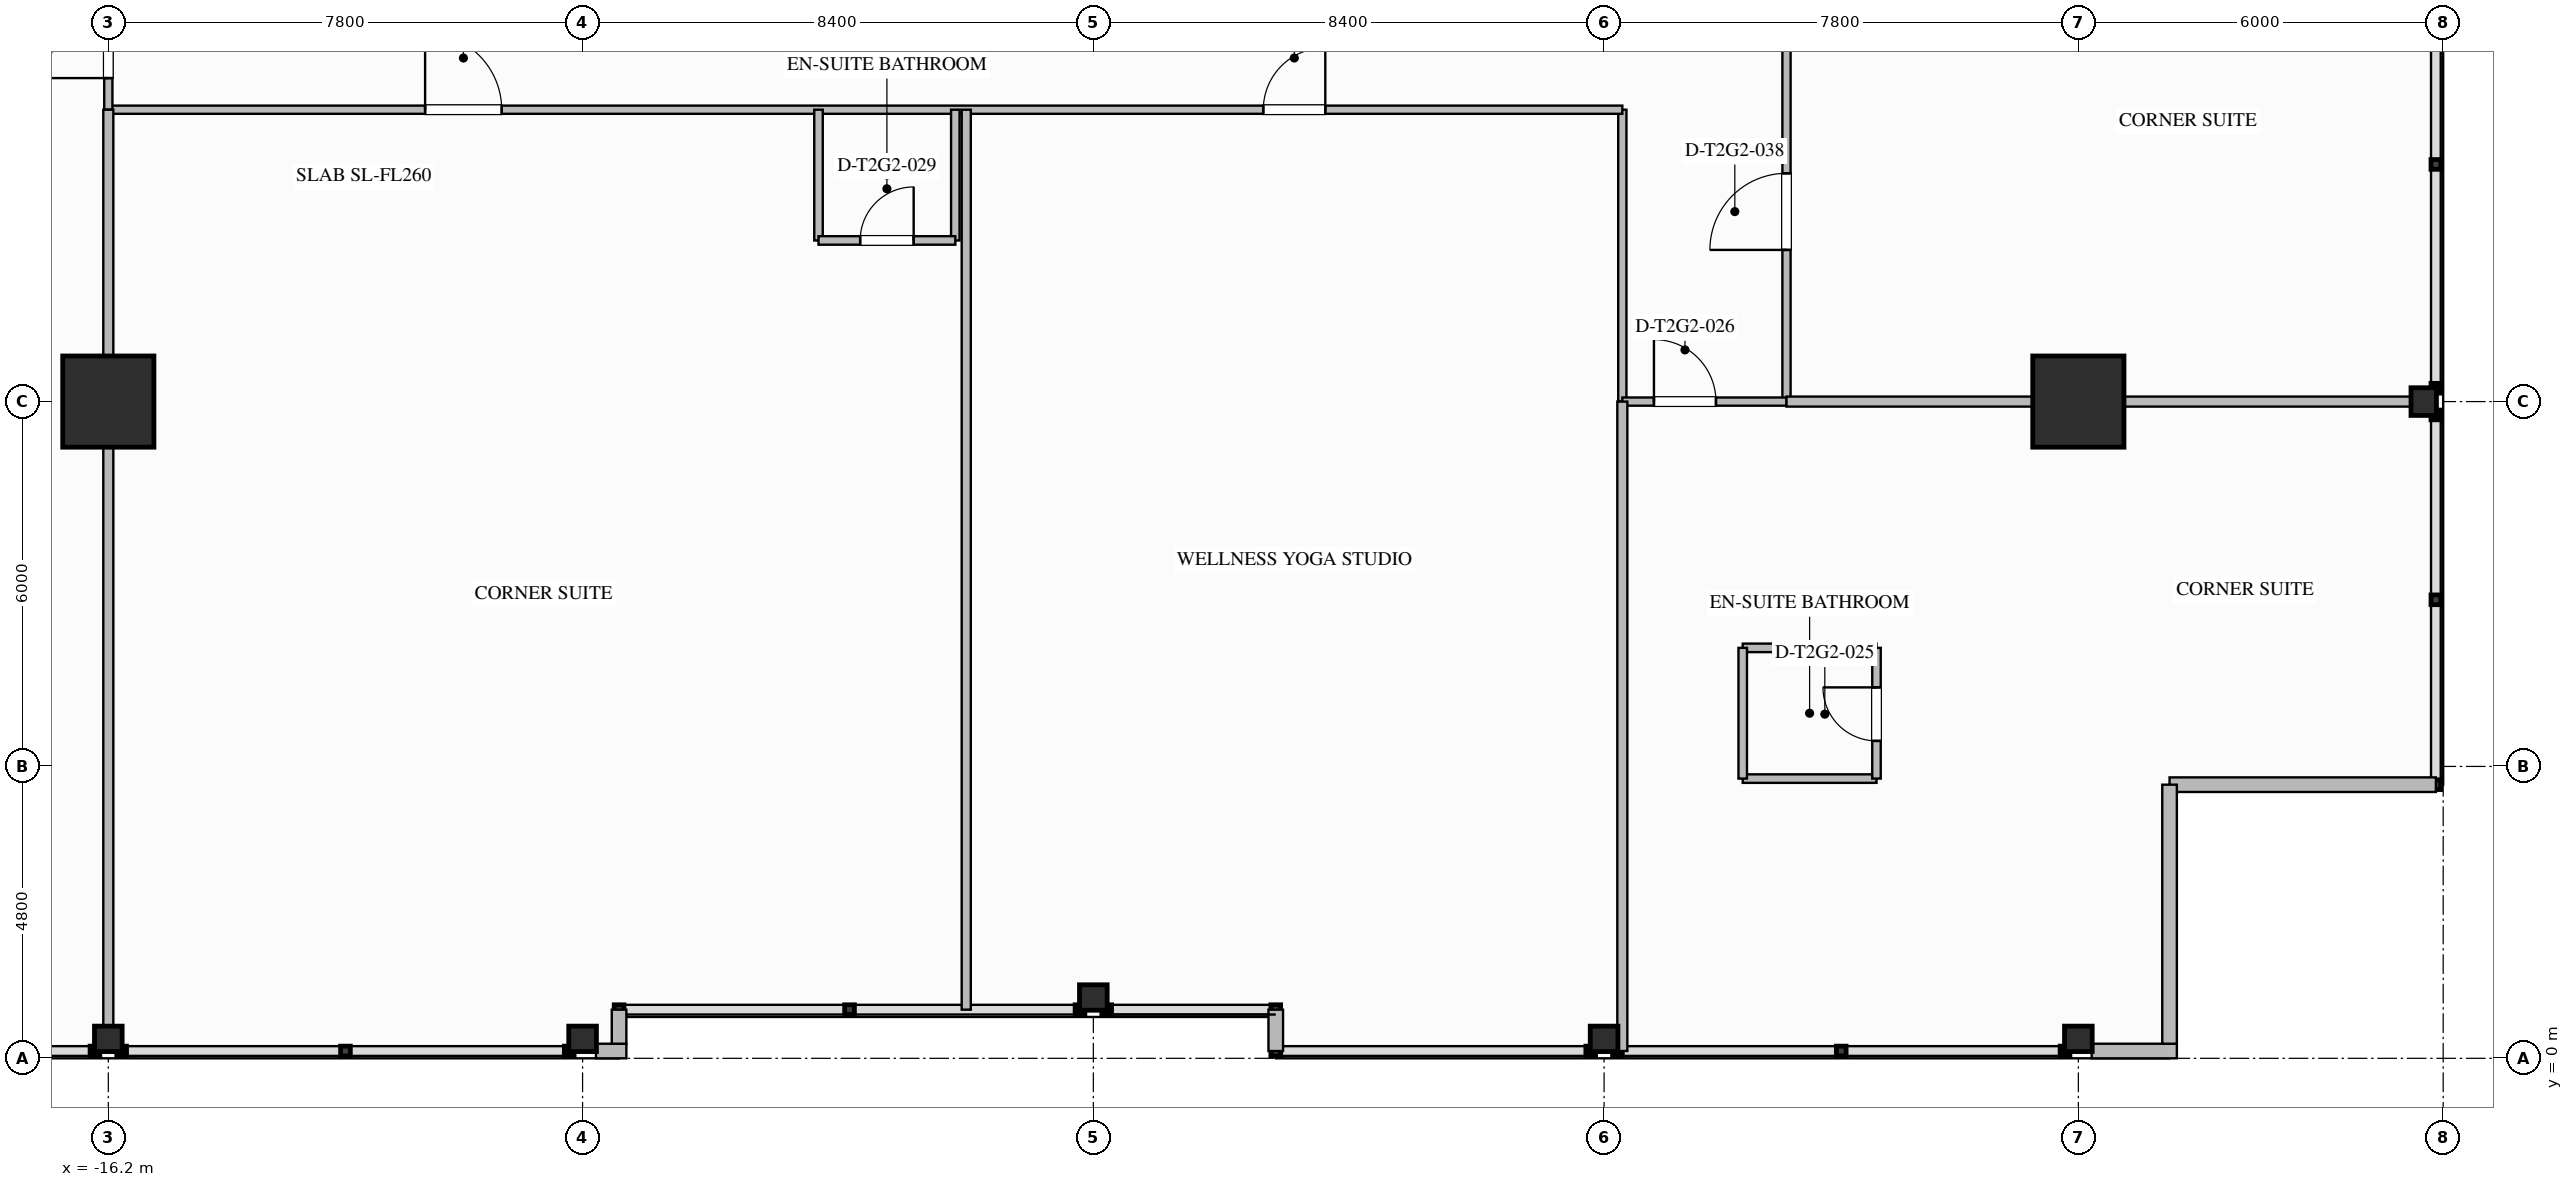
"""IFC4 building model, lengths in metres.
Left out: names, types, materials, properties, quantities, classifications, styles, units other than length and angle.
Written with IfcOpenShell. Run it as: python <this file> out.ifc"""

import sys

from ifc_helpers import new_model, si_unit, direction, frame, frame_2d, origin, origin_2d, place, context, subcontext, project, spatial, rectangle, i_section, extrude, element, fill, save


model = new_model("IFC4")
c1 = context("Model", 3, precision=1e-05, world=origin(), true_north=direction((0.0, 1.0)))
c2 = subcontext(c1, "Body", "Model", "MODEL_VIEW")
j1 = project(units=[si_unit("LENGTHUNIT", "METRE"), si_unit("PLANEANGLEUNIT", "RADIAN")], contexts=[c1])
p1 = place(None, origin())
s1 = spatial("IfcSite", under=j1, at=p1, CompositionType="ELEMENT")
p2 = place(p1, origin())
s2 = spatial("IfcBuilding", under=s1, at=p2, CompositionType="ELEMENT")
p3 = place(p2, frame((0.0, 0.0, 102.3)))
s3 = spatial("IfcBuildingStorey", under=s2, at=p3, CompositionType="ELEMENT", Elevation=102.3)
for number, where, z_axis, x_axis in (
    (1, (-16.2, 10.8, 0.0), (0.0, 0.0, 1.0), (1.0, 0.0, 0.0)),
    (2, (16.2, 10.8, 0.0), (0.0, 0.0, 1.0), (1.0, 0.0, 0.0)),
):
    element("IfcColumn", number, at=place(p3, frame(where, z_axis=z_axis, x_axis=x_axis)), inside=s3, PredefinedType="COLUMN", context=c2, shape_type="SweptSolid", body=[
        extrude(rectangle(XDim=1.5, YDim=1.5, at=origin_2d()), origin(), (0.0, 0.0, 1.0), 3.5),
    ])
for number, where, z_axis, x_axis in (
    (3, (21.88, 10.8, 0.0), (0.0, 0.0, 1.0), (1.0, 0.0, 0.0)),
    (4, (-16.2, 0.32, 0.0), (0.0, 0.0, 1.0), (0.0, 1.0, 0.0)),
    (5, (-8.4, 0.32, 0.0), (0.0, 0.0, 1.0), (0.0, 1.0, 0.0)),
    (6, (0.0, 1.0, 0.0), (0.0, 0.0, 1.0), (0.0, 1.0, 0.0)),
    (7, (8.4, 0.32, 0.0), (0.0, 0.0, 1.0), (0.0, 1.0, 0.0)),
    (8, (16.2, 0.32, 0.0), (0.0, 0.0, 1.0), (0.0, 1.0, 0.0)),
):
    element("IfcColumn", number, at=place(p3, frame(where, z_axis=z_axis, x_axis=x_axis)), inside=s3, PredefinedType="COLUMN", context=c2, shape_type="SweptSolid", body=[
        extrude(i_section(OverallWidth=0.418, OverallDepth=0.455, WebThickness=0.042, FlangeThickness=0.068, FilletRadius=0.03, at=origin_2d()), origin(), (0.0, 0.0, 1.0), 3.497),
    ])
p4 = place(p3, frame((17.82, 0.12, 0.0), z_axis=(0.0, 0.0, 1.0), x_axis=(-1.0, 0.0, 0.0)))
e9 = element("IfcWall", 9, at=p4, inside=s3, PredefinedType="STANDARD", context=c2, shape_type="SweptSolid", body=[
    extrude(rectangle(XDim=1.4, YDim=0.24, at=frame_2d((0.7, 0.0))), origin(), (0.0, 0.0, 1.0), 3.24),
])
p5 = place(p3, frame((-7.68, 0.12, 0.0), z_axis=(0.0, 0.0, 1.0), x_axis=(-1.0, 0.0, 0.0)))
e10 = element("IfcWall", 10, at=p5, inside=s3, PredefinedType="STANDARD", context=c2, shape_type="SweptSolid", body=[
    extrude(rectangle(XDim=0.5, YDim=0.24, at=frame_2d((0.25, 0.0))), origin(), (0.0, 0.0, 1.0), 3.24),
])
p6 = place(p3, frame((22.08, 4.5, 0.0), z_axis=(0.0, 0.0, 1.0), x_axis=(-1.0, 0.0, 0.0)))
e11 = element("IfcWall", 11, at=p6, inside=s3, PredefinedType="STANDARD", context=c2, shape_type="SweptSolid", body=[
    extrude(rectangle(XDim=4.38, YDim=0.24, at=frame_2d((2.19, 0.0))), origin(), (0.0, 0.0, 1.0), 3.24),
])
p7 = place(p3, frame((17.7, 4.5, 0.0), z_axis=(0.0, 0.0, 1.0), x_axis=(0.0, -1.0, 0.0)))
e12 = element("IfcWall", 12, at=p7, inside=s3, PredefinedType="STANDARD", context=c2, shape_type="SweptSolid", body=[
    extrude(rectangle(XDim=4.26, YDim=0.24, at=frame_2d((2.13, 0.0))), origin(), (0.0, 0.0, 1.0), 3.24),
])
p8 = place(p3, frame((3.0, 0.12, 0.0), z_axis=(0.0, 0.0, 1.0), x_axis=(0.0, 1.0, 0.0)))
e13 = element("IfcWall", 13, at=p8, inside=s3, PredefinedType="STANDARD", context=c2, shape_type="SweptSolid", body=[
    extrude(rectangle(XDim=0.68, YDim=0.24, at=frame_2d((0.34, 0.0))), origin(), (0.0, 0.0, 1.0), 3.24),
])
p9 = place(p3, frame((-7.8, 0.8, 0.0), z_axis=(0.0, 0.0, 1.0), x_axis=(0.0, -1.0, 0.0)))
e14 = element("IfcWall", 14, at=p9, inside=s3, PredefinedType="STANDARD", context=c2, shape_type="SweptSolid", body=[
    extrude(rectangle(XDim=0.56, YDim=0.24, at=frame_2d((0.28, 0.0))), origin(), (0.0, 0.0, 1.0), 3.24),
])
p10 = place(p3, frame((8.7, 10.8, 0.0), z_axis=(0.0, 0.0, 1.0), x_axis=(0.0, 1.0, 0.0)))
e15 = element("IfcWall", 15, at=p10, inside=s3, PredefinedType="PARTITIONING", context=c2, shape_type="SweptSolid", body=[
    extrude(rectangle(XDim=4.8, YDim=0.135, at=frame_2d((2.4, 0.0))), origin(), (0.0, 0.0, 1.0), 3.24),
])
p11 = place(p3, frame((-16.2, 15.6, 0.0), z_axis=(0.0, 0.0, 1.0), x_axis=(1.0, 0.0, 0.0)))
e16 = element("IfcWall", 16, at=p11, inside=s3, PredefinedType="PARTITIONING", context=c2, shape_type="SweptSolid", body=[
    extrude(rectangle(XDim=24.9, YDim=0.135, at=frame_2d((12.45, 0.0))), origin(), (0.0, 0.0, 1.0), 3.24),
])
p12 = place(p11, frame((5.21, 0.0, 0.0)))
e17 = element("IfcOpeningElement", 17, at=p12, cuts=e16, PredefinedType="OPENING", context=c2, shape_type="SweptSolid", body=[
    extrude(rectangle(XDim=1.26, YDim=2.2, at=frame_2d((0.63, 1.1))), frame((0.0, 0.077, 0.0), z_axis=(0.0, -1.0, 0.0), x_axis=(1.0, 0.0, 0.0)), (0.0, 0.0, 1.0), 0.155),
])
p13 = place(p11, frame((18.995, 0.0, 0.0)))
e18 = element("IfcOpeningElement", 18, at=p13, cuts=e16, PredefinedType="OPENING", context=c2, shape_type="SweptSolid", body=[
    extrude(rectangle(XDim=1.02, YDim=2.15, at=frame_2d((0.51, 1.075))), frame((0.0, 0.077, 0.0), z_axis=(0.0, -1.0, 0.0), x_axis=(1.0, 0.0, 0.0)), (0.0, 0.0, 1.0), 0.155),
])
p14 = place(p3, frame((11.4, 10.8, 0.0), z_axis=(0.0, 0.0, 1.0), x_axis=(0.0, 1.0, 0.0)))
e19 = element("IfcWall", 19, at=p14, inside=s3, PredefinedType="PARTITIONING", context=c2, shape_type="SweptSolid", body=[
    extrude(rectangle(XDim=32.4, YDim=0.135, at=frame_2d((16.2, 0.0))), origin(), (0.0, 0.0, 1.0), 3.24),
])
p15 = place(p14, frame((2.494, 0.0, 0.0)))
e20 = element("IfcOpeningElement", 20, at=p15, cuts=e19, PredefinedType="OPENING", context=c2, shape_type="SweptSolid", body=[
    extrude(rectangle(XDim=1.26, YDim=2.2, at=frame_2d((0.63, 1.1))), frame((0.0, 0.077, 0.0), z_axis=(0.0, -1.0, 0.0), x_axis=(1.0, 0.0, 0.0)), (0.0, 0.0, 1.0), 0.155),
])
p16 = place(p14, frame((10.305, 0.0, 0.0)))
e21 = element("IfcOpeningElement", 21, at=p16, cuts=e19, PredefinedType="OPENING", context=c2, shape_type="SweptSolid", body=[
    extrude(rectangle(XDim=1.26, YDim=2.2, at=frame_2d((0.63, 1.1))), frame((0.0, 0.077, 0.0), z_axis=(0.0, -1.0, 0.0), x_axis=(1.0, 0.0, 0.0)), (0.0, 0.0, 1.0), 0.155),
])
p17 = place(p14, frame((18.405, 0.0, 0.0)))
e22 = element("IfcOpeningElement", 22, at=p17, cuts=e19, PredefinedType="OPENING", context=c2, shape_type="SweptSolid", body=[
    extrude(rectangle(XDim=1.26, YDim=2.2, at=frame_2d((0.63, 1.1))), frame((0.0, 0.077, 0.0), z_axis=(0.0, -1.0, 0.0), x_axis=(1.0, 0.0, 0.0)), (0.0, 0.0, 1.0), 0.155),
])
p18 = place(p14, frame((26.794, 0.0, 0.0)))
e23 = element("IfcOpeningElement", 23, at=p18, cuts=e19, PredefinedType="OPENING", context=c2, shape_type="SweptSolid", body=[
    extrude(rectangle(XDim=1.26, YDim=2.2, at=frame_2d((0.63, 1.1))), frame((0.0, 0.077, 0.0), z_axis=(0.0, -1.0, 0.0), x_axis=(1.0, 0.0, 0.0)), (0.0, 0.0, 1.0), 0.155),
])
p19 = place(p3, frame((-16.2, 15.6, 0.0), z_axis=(0.0, 0.0, 1.0), x_axis=(0.0, 1.0, 0.0)))
e24 = element("IfcWall", 24, at=p19, inside=s3, PredefinedType="PARTITIONING", context=c2, shape_type="SweptSolid", body=[
    extrude(rectangle(XDim=2.7, YDim=0.135, at=frame_2d((1.35, 0.0))), origin(), (0.0, 0.0, 1.0), 2.452),
])
p20 = place(p19, frame((0.52, 0.0, 0.0)))
e25 = element("IfcOpeningElement", 25, at=p20, cuts=e24, PredefinedType="OPENING", context=c2, shape_type="SweptSolid", body=[
    extrude(rectangle(XDim=1.02, YDim=2.15, at=frame_2d((0.51, 1.075))), frame((0.0, 0.077, 0.0), z_axis=(0.0, -1.0, 0.0), x_axis=(1.0, 0.0, 0.0)), (0.0, 0.0, 1.0), 0.155),
])
p21 = place(p3, frame((8.7, 10.8, 0.0), z_axis=(0.0, 0.0, 1.0), x_axis=(1.0, 0.0, 0.0)))
e26 = element("IfcWall", 26, at=p21, inside=s3, PredefinedType="PARTITIONING", context=c2, shape_type="SweptSolid", body=[
    extrude(rectangle(XDim=2.7, YDim=0.135, at=frame_2d((1.35, 0.0))), origin(), (0.0, 0.0, 1.0), 2.452),
])
p22 = place(p21, frame((0.52, 0.0, 0.0)))
e27 = element("IfcOpeningElement", 27, at=p22, cuts=e26, PredefinedType="OPENING", context=c2, shape_type="SweptSolid", body=[
    extrude(rectangle(XDim=1.02, YDim=2.15, at=frame_2d((0.51, 1.075))), frame((0.0, 0.077, 0.0), z_axis=(0.0, -1.0, 0.0), x_axis=(1.0, 0.0, 0.0)), (0.0, 0.0, 1.0), 0.155),
])
p23 = place(p3, frame((-16.2, 0.12, 0.0), z_axis=(0.0, 0.0, 1.0), x_axis=(0.0, 1.0, 0.0)))
e28 = element("IfcWall", 28, at=p23, inside=s3, PredefinedType="PARTITIONING", context=c2, shape_type="SweptSolid", body=[
    extrude(rectangle(XDim=15.48, YDim=0.165, at=frame_2d((7.74, 0.0))), origin(), (0.0, 0.0, 1.0), 2.452),
])
p24 = place(p3, frame((8.7, 0.12, 0.0), z_axis=(0.0, 0.0, 1.0), x_axis=(0.0, 1.0, 0.0)))
e29 = element("IfcWall", 29, at=p24, inside=s3, PredefinedType="PARTITIONING", context=c2, shape_type="SweptSolid", body=[
    extrude(rectangle(XDim=10.68, YDim=0.165, at=frame_2d((5.34, 0.0))), origin(), (0.0, 0.0, 1.0), 2.452),
])
p25 = place(p3, frame((11.4, 10.8, 0.0), z_axis=(0.0, 0.0, 1.0), x_axis=(1.0, 0.0, 0.0)))
e30 = element("IfcWall", 30, at=p25, inside=s3, PredefinedType="PARTITIONING", context=c2, shape_type="SweptSolid", body=[
    extrude(rectangle(XDim=10.68, YDim=0.165, at=frame_2d((5.34, 0.0))), origin(), (0.0, 0.0, 1.0), 2.452),
])
for number, where, z_axis, x_axis in (
    (31, (10.68, 4.6, 0.0), (0.0, 0.0, 1.0), (1.0, 0.0, 0.0)),
    (32, (10.68, 6.75, 0.0), (0.0, 0.0, 1.0), (1.0, 0.0, 0.0)),
):
    element("IfcWall", number, at=place(p3, frame(where, z_axis=z_axis, x_axis=x_axis)), inside=s3, PredefinedType="PLUMBINGWALL", context=c2, shape_type="SweptSolid", body=[
        extrude(rectangle(XDim=2.2, YDim=0.14, at=frame_2d((1.1, 0.0))), origin(), (0.0, 0.0, 1.0), 3.24),
    ])
p26 = place(p3, frame((10.68, 4.6, 0.0), z_axis=(0.0, 0.0, 1.0), x_axis=(0.0, 1.0, 0.0)))
e33 = element("IfcWall", 33, at=p26, inside=s3, PredefinedType="PLUMBINGWALL", context=c2, shape_type="SweptSolid", body=[
    extrude(rectangle(XDim=2.15, YDim=0.14, at=frame_2d((1.075, 0.0))), origin(), (0.0, 0.0, 1.0), 3.24),
])
p27 = place(p3, frame((12.88, 4.6, 0.0), z_axis=(0.0, 0.0, 1.0), x_axis=(0.0, 1.0, 0.0)))
e34 = element("IfcWall", 34, at=p27, inside=s3, PredefinedType="PLUMBINGWALL", context=c2, shape_type="SweptSolid", body=[
    extrude(rectangle(XDim=2.15, YDim=0.14, at=frame_2d((1.075, 0.0))), origin(), (0.0, 0.0, 1.0), 3.24),
])
p28 = place(p27, frame((0.62, 0.0, 0.0)))
e35 = element("IfcOpeningElement", 35, at=p28, cuts=e34, PredefinedType="OPENING", context=c2, shape_type="SweptSolid", body=[
    extrude(rectangle(XDim=0.88, YDim=2.1, at=frame_2d((0.44, 1.05))), frame((0.0, 0.08, 0.0), z_axis=(0.0, -1.0, 0.0), x_axis=(1.0, 0.0, 0.0)), (0.0, 0.0, 1.0), 0.16),
])
for number, where, z_axis, x_axis in (
    (36, (-4.52, 15.6, 0.0), (0.0, 0.0, 1.0), (0.0, -1.0, 0.0)),
    (37, (-2.27, 15.6, 0.0), (0.0, 0.0, 1.0), (0.0, -1.0, 0.0)),
):
    element("IfcWall", number, at=place(p3, frame(where, z_axis=z_axis, x_axis=x_axis)), inside=s3, PredefinedType="PLUMBINGWALL", context=c2, shape_type="SweptSolid", body=[
        extrude(rectangle(XDim=2.15, YDim=0.14, at=frame_2d((1.075, 0.0))), origin(), (0.0, 0.0, 1.0), 3.24),
    ])
p29 = place(p3, frame((-4.52, 13.45, 0.0), z_axis=(0.0, 0.0, 1.0), x_axis=(1.0, 0.0, 0.0)))
e38 = element("IfcWall", 38, at=p29, inside=s3, PredefinedType="PLUMBINGWALL", context=c2, shape_type="SweptSolid", body=[
    extrude(rectangle(XDim=2.25, YDim=0.14, at=frame_2d((1.125, 0.0))), origin(), (0.0, 0.0, 1.0), 3.24),
])
p30 = place(p29, frame((0.685, 0.0, 0.0)))
e39 = element("IfcOpeningElement", 39, at=p30, cuts=e38, PredefinedType="OPENING", context=c2, shape_type="SweptSolid", body=[
    extrude(rectangle(XDim=0.88, YDim=2.1, at=frame_2d((0.44, 1.05))), frame((0.0, 0.08, 0.0), z_axis=(0.0, -1.0, 0.0), x_axis=(1.0, 0.0, 0.0)), (0.0, 0.0, 1.0), 0.16),
])
p31 = place(p3, frame((-2.09, 0.8, 0.0), z_axis=(0.0, 0.0, 1.0), x_axis=(0.0, 1.0, 0.0)))
e40 = element("IfcWall", 40, at=p31, inside=s3, PredefinedType="PARTITIONING", context=c2, shape_type="SweptSolid", body=[
    extrude(rectangle(XDim=14.8, YDim=0.15, at=frame_2d((7.4, 0.0))), origin(), (0.0, 0.0, 1.0), 3.24),
])
p32 = place(p20, origin())
e41 = element("IfcDoor", 41, at=p32, inside=s3, OperationType="SINGLE_SWING_LEFT", PredefinedType="DOOR", context=c2, shape_type="SweptSolid", body=[
    extrude(rectangle(XDim=1.02, YDim=2.15, at=frame_2d((0.51, 1.075))), frame((0.0, 0.025, 0.0), z_axis=(0.0, -1.0, 0.0), x_axis=(1.0, 0.0, 0.0)), (0.0, 0.0, 1.0), 0.05),
])
fill(e25, e41)
p33 = place(p28, origin())
e42 = element("IfcDoor", 42, at=p33, inside=s3, OperationType="SINGLE_SWING_RIGHT", PredefinedType="DOOR", context=c2, shape_type="SweptSolid", body=[
    extrude(rectangle(XDim=0.88, YDim=2.1, at=frame_2d((0.44, 1.05))), frame((0.0, 0.025, 0.0), z_axis=(0.0, -1.0, 0.0), x_axis=(1.0, 0.0, 0.0)), (0.0, 0.0, 1.0), 0.05),
])
fill(e35, e42)
p34 = place(p22, origin())
e43 = element("IfcDoor", 43, at=p34, inside=s3, OperationType="SINGLE_SWING_LEFT", PredefinedType="DOOR", context=c2, shape_type="SweptSolid", body=[
    extrude(rectangle(XDim=1.02, YDim=2.15, at=frame_2d((0.51, 1.075))), frame((0.0, 0.025, 0.0), z_axis=(0.0, -1.0, 0.0), x_axis=(1.0, 0.0, 0.0)), (0.0, 0.0, 1.0), 0.05),
])
fill(e27, e43)
p35 = place(p30, origin())
e44 = element("IfcDoor", 44, at=p35, inside=s3, OperationType="SINGLE_SWING_RIGHT", PredefinedType="DOOR", context=c2, shape_type="SweptSolid", body=[
    extrude(rectangle(XDim=0.88, YDim=2.1, at=frame_2d((0.44, 1.05))), frame((0.0, 0.025, 0.0), z_axis=(0.0, -1.0, 0.0), x_axis=(1.0, 0.0, 0.0)), (0.0, 0.0, 1.0), 0.05),
])
fill(e39, e44)
p36 = place(p12, origin())
e45 = element("IfcDoor", 45, at=p36, inside=s3, OperationType="SINGLE_SWING_LEFT", PredefinedType="DOOR", context=c2, shape_type="SweptSolid", body=[
    extrude(rectangle(XDim=1.26, YDim=2.2, at=frame_2d((0.63, 1.1))), frame((0.0, 0.025, 0.0), z_axis=(0.0, -1.0, 0.0), x_axis=(1.0, 0.0, 0.0)), (0.0, 0.0, 1.0), 0.05),
])
fill(e17, e45)
p37 = place(p13, origin())
e46 = element("IfcDoor", 46, at=p37, inside=s3, OperationType="SINGLE_SWING_RIGHT", PredefinedType="DOOR", context=c2, shape_type="SweptSolid", body=[
    extrude(rectangle(XDim=1.02, YDim=2.15, at=frame_2d((0.51, 1.075))), frame((0.0, 0.025, 0.0), z_axis=(0.0, -1.0, 0.0), x_axis=(1.0, 0.0, 0.0)), (0.0, 0.0, 1.0), 0.05),
])
fill(e18, e46)
p38 = place(p15, origin())
e47 = element("IfcDoor", 47, at=p38, inside=s3, OperationType="SINGLE_SWING_LEFT", PredefinedType="DOOR", context=c2, shape_type="SweptSolid", body=[
    extrude(rectangle(XDim=1.26, YDim=2.2, at=frame_2d((0.63, 1.1))), frame((0.0, 0.025, 0.0), z_axis=(0.0, -1.0, 0.0), x_axis=(1.0, 0.0, 0.0)), (0.0, 0.0, 1.0), 0.05),
])
fill(e20, e47)
save(model, sys.argv[1])
